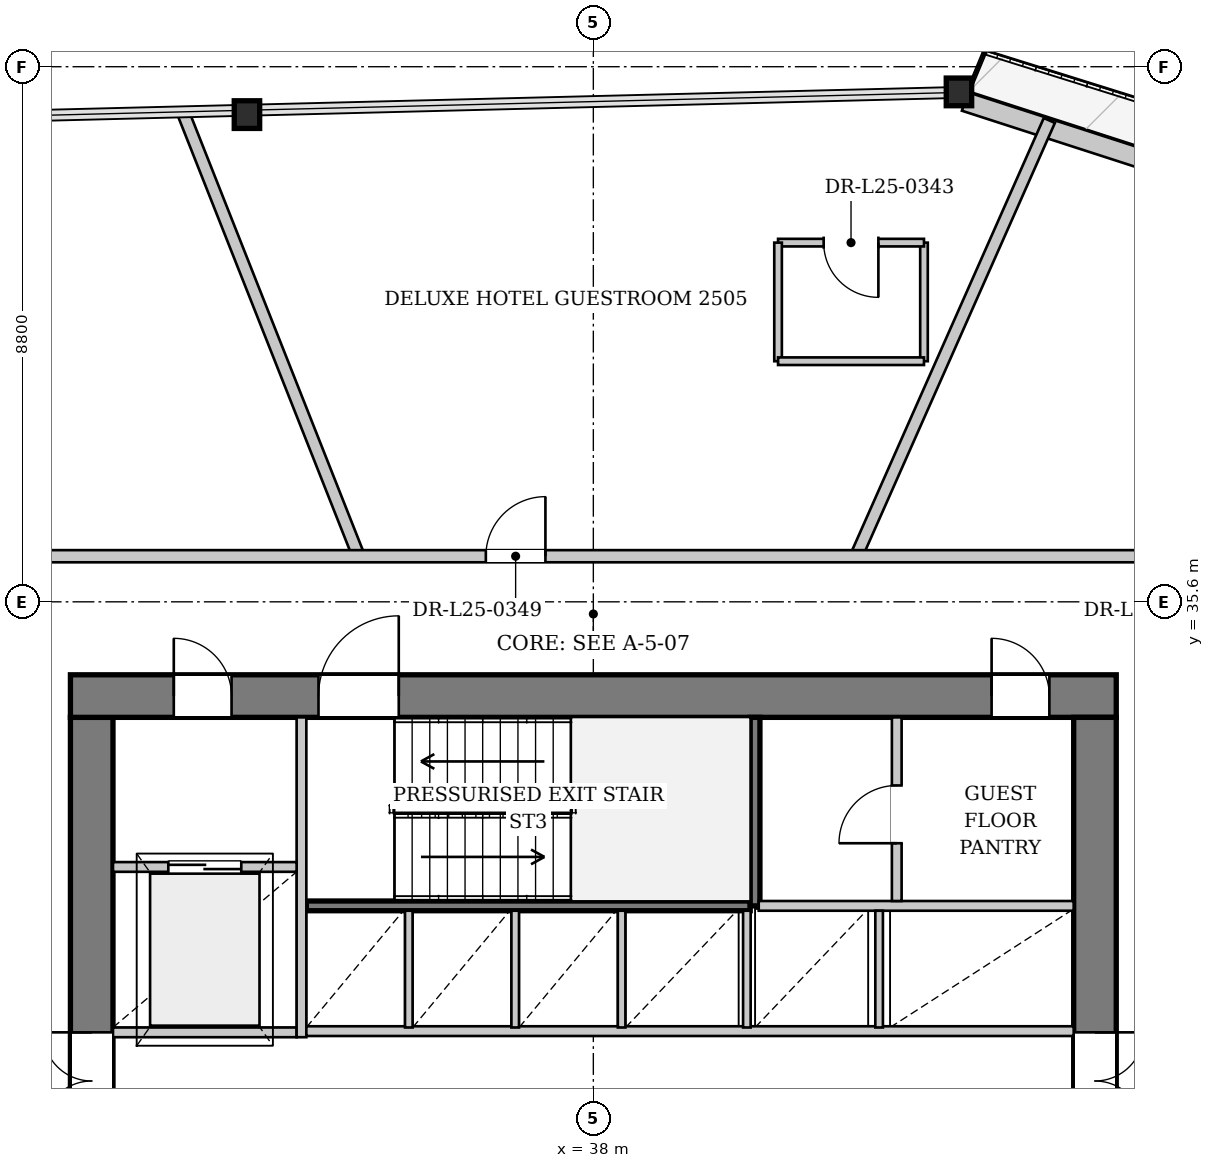
"""IFC4 building model, lengths in metres.
Left out: names, types, materials, properties, quantities, classifications, styles, units other than length and angle.
Written with IfcOpenShell. Run it as: python <this file> out.ifc"""

import sys

from ifc_helpers import new_model, si_unit, direction, frame, frame_2d, origin, origin_2d, place, context, subcontext, project, spatial, rectangle, i_section, extrude, source, transform, mapped, element, fill, save


model = new_model("IFC4")
c1 = context("Model", 3, precision=1e-05, world=origin(), true_north=direction((0.0, 1.0)))
c2 = subcontext(c1, "Body", "Model", "MODEL_VIEW")
j1 = project(units=[si_unit("LENGTHUNIT", "METRE"), si_unit("PLANEANGLEUNIT", "RADIAN")], contexts=[c1])
p1 = place(None, origin())
s1 = spatial("IfcSite", under=j1, at=p1, CompositionType="ELEMENT")
p2 = place(p1, origin())
s2 = spatial("IfcBuilding", under=s1, at=p2, CompositionType="ELEMENT")
p3 = place(p2, frame((0.0, 0.0, 98.6)))
s3 = spatial("IfcBuildingStorey", under=s2, at=p3, CompositionType="ELEMENT", Elevation=98.6)
m1 = source(origin(), c2, "Body", "SweptSolid", [
    extrude(i_section(OverallWidth=0.418, OverallDepth=0.455, WebThickness=0.038, FlangeThickness=0.059, at=origin_2d()), origin(), (0.0, 0.0, 1.0), 3.398),
])
p4 = place(p3, frame((44.16, 43.981, 0.0), z_axis=(-0.086440081787, 0.003017858217, 0.996252480445), x_axis=(-0.034891460117, -0.999391107631, 0.0)))
e1 = element("IfcColumn", 1, at=p4, inside=s3, PredefinedType="COLUMN", context=c2, shape_type="MappedRepresentation", body=[
    mapped(m1, transform((0.0, 0.0, 0.0), x_axis=(1.0, 0.0, 0.0), y_axis=(0.0, 1.0, 0.0), z_axis=(0.0, 0.0, 1.0), scale=1.0)),
])
m2 = source(origin(), c2, "Body", "SweptSolid", [
    extrude(i_section(OverallWidth=0.418, OverallDepth=0.455, WebThickness=0.038, FlangeThickness=0.059, at=origin_2d()), origin(), (0.0, 0.0, 1.0), 3.399),
])
p5 = place(p3, frame((32.44, 43.688, 0.0), z_axis=(-0.080295380378, -0.044169641263, 0.995791993682), x_axis=(0.481978917969, -0.876182813478, 0.0)))
e2 = element("IfcColumn", 2, at=p5, inside=s3, PredefinedType="COLUMN", context=c2, shape_type="MappedRepresentation", body=[
    mapped(m2, transform((0.0, 0.0, 0.0), x_axis=(1.0, 0.0, 0.0), y_axis=(0.0, 1.0, 0.0), z_axis=(0.0, 0.0, 1.0), scale=1.0)),
])
p6 = place(p3, frame((44.111, 43.829, 0.0), z_axis=(0.0, 0.0, 1.0), x_axis=(0.951457074242, -0.307781474224, 0.0)))
e3 = element("IfcWall", 3, at=p6, inside=s3, PredefinedType="SOLIDWALL", context=c2, shape_type="SweptSolid", body=[
    extrude(rectangle(XDim=23.448, YDim=0.32, at=frame_2d((11.724, 0.0))), origin(), (0.0, 0.0, 1.0), 2.692),
])
p7 = place(p6, frame((6.953, 0.0, 0.0)))
e4 = element("IfcOpeningElement", 4, at=p7, cuts=e3, PredefinedType="OPENING", context=c2, shape_type="SweptSolid", body=[
    extrude(rectangle(XDim=1.1, YDim=2.3, at=frame_2d((0.55, 1.15))), frame((0.0, 0.17, 0.0), z_axis=(0.0, -1.0, 0.0), x_axis=(1.0, 0.0, 0.0)), (0.0, 0.0, 1.0), 0.34),
])
p8 = place(p6, frame((16.451, 0.0, 0.372)))
e5 = element("IfcOpeningElement", 5, at=p8, cuts=e3, PredefinedType="OPENING", context=c2, shape_type="SweptSolid", body=[
    extrude(rectangle(XDim=1.8, YDim=2.2, at=frame_2d((0.9, 1.1))), frame((0.0, 0.17, 0.0), z_axis=(0.0, -1.0, 0.0), x_axis=(1.0, 0.0, 0.0)), (0.0, 0.0, 1.0), 0.34),
])
p9 = place(p3, frame((29.75, 19.5, 0.0), z_axis=(0.0, 0.0, 1.0), x_axis=(0.0, 1.0, 0.0)))
e6 = element("IfcWall", 6, at=p9, inside=s3, PredefinedType="SHEAR", context=c2, shape_type="SweptSolid", body=[
    extrude(rectangle(XDim=14.2, YDim=0.7, at=frame_2d((7.1, 0.0))), origin(), (0.0, 0.0, 1.0), 3.3),
])
p10 = place(p9, frame((7.42, 0.0, 0.0)))
e7 = element("IfcOpeningElement", 7, at=p10, cuts=e6, PredefinedType="OPENING", context=c2, shape_type="SweptSolid", body=[
    extrude(rectangle(XDim=1.6, YDim=2.2, at=frame_2d((0.8, 1.1))), frame((0.0, 0.36, 0.0), z_axis=(0.0, -1.0, 0.0), x_axis=(1.0, 0.0, 0.0)), (0.0, 0.0, 1.0), 0.72),
])
p11 = place(p3, frame((29.4, 34.05, 0.0), z_axis=(0.0, 0.0, 1.0), x_axis=(1.0, 0.0, 0.0)))
e8 = element("IfcWall", 8, at=p11, inside=s3, PredefinedType="SHEAR", context=c2, shape_type="SweptSolid", body=[
    extrude(rectangle(XDim=17.2, YDim=0.7, at=frame_2d((8.6, 0.0))), origin(), (0.0, 0.0, 1.0), 3.3),
])
p12 = place(p11, frame((1.7, 0.0, 0.0)))
e9 = element("IfcOpeningElement", 9, at=p12, cuts=e8, PredefinedType="OPENING", context=c2, shape_type="SweptSolid", body=[
    extrude(rectangle(XDim=0.95, YDim=2.1, at=frame_2d((0.475, 1.05))), frame((0.0, 0.36, 0.0), z_axis=(0.0, -1.0, 0.0), x_axis=(1.0, 0.0, 0.0)), (0.0, 0.0, 1.0), 0.72),
])
p13 = place(p11, frame((4.08, 0.0, 0.0)))
e10 = element("IfcOpeningElement", 10, at=p13, cuts=e8, PredefinedType="OPENING", context=c2, shape_type="SweptSolid", body=[
    extrude(rectangle(XDim=1.32, YDim=2.2, at=frame_2d((0.66, 1.1))), frame((0.0, 0.36, 0.0), z_axis=(0.0, -1.0, 0.0), x_axis=(1.0, 0.0, 0.0)), (0.0, 0.0, 1.0), 0.72),
])
p14 = place(p11, frame((15.15, 0.0, 0.0)))
e11 = element("IfcOpeningElement", 11, at=p14, cuts=e8, PredefinedType="OPENING", context=c2, shape_type="SweptSolid", body=[
    extrude(rectangle(XDim=0.95, YDim=2.1, at=frame_2d((0.475, 1.05))), frame((0.0, 0.36, 0.0), z_axis=(0.0, -1.0, 0.0), x_axis=(1.0, 0.0, 0.0)), (0.0, 0.0, 1.0), 0.72),
])
p15 = place(p3, frame((46.25, 33.7, 0.0), z_axis=(0.0, 0.0, 1.0), x_axis=(0.0, -1.0, 0.0)))
e12 = element("IfcWall", 12, at=p15, inside=s3, PredefinedType="SHEAR", context=c2, shape_type="SweptSolid", body=[
    extrude(rectangle(XDim=14.2, YDim=0.7, at=frame_2d((7.1, 0.0))), origin(), (0.0, 0.0, 1.0), 3.3),
])
p16 = place(p15, frame((5.18, 0.0, 0.0)))
e13 = element("IfcOpeningElement", 13, at=p16, cuts=e12, PredefinedType="OPENING", context=c2, shape_type="SweptSolid", body=[
    extrude(rectangle(XDim=1.6, YDim=2.2, at=frame_2d((0.8, 1.1))), frame((0.0, 0.36, 0.0), z_axis=(0.0, -1.0, 0.0), x_axis=(1.0, 0.0, 0.0)), (0.0, 0.0, 1.0), 0.72),
])
p17 = place(p3, frame((33.28, 30.6, 0.0), z_axis=(0.0, 0.0, 1.0), x_axis=(1.0, 0.0, 0.0)))
e14 = element("IfcWall", 14, at=p17, inside=s3, PredefinedType="PARTITIONING", context=c2, shape_type="SweptSolid", body=[
    extrude(rectangle(XDim=7.3, YDim=0.16, at=frame_2d((3.65, 0.0))), origin(), (0.0, 0.0, 1.0), 3.3),
])
p18 = place(p3, frame((40.66, 30.6, 0.0), z_axis=(0.0, 0.0, 1.0), x_axis=(0.0, 1.0, 0.0)))
e15 = element("IfcWall", 15, at=p18, inside=s3, PredefinedType="PARTITIONING", context=c2, shape_type="SweptSolid", body=[
    extrude(rectangle(XDim=3.1, YDim=0.16, at=frame_2d((1.55, 0.0))), origin(), (0.0, 0.0, 1.0), 3.3),
])
p19 = place(p3, frame((30.1, 28.52, 0.0), z_axis=(0.0, 0.0, 1.0), x_axis=(1.0, 0.0, 0.0)))
e16 = element("IfcWall", 16, at=p19, inside=s3, PredefinedType="PARTITIONING", context=c2, shape_type="SweptSolid", body=[
    extrude(rectangle(XDim=3.02, YDim=0.16, at=frame_2d((1.51, 0.0))), origin(), (0.0, 0.0, 1.0), 3.3),
])
p20 = place(p3, frame((33.2, 28.44, 0.0), z_axis=(0.0, 0.0, 1.0), x_axis=(0.0, 1.0, 0.0)))
e17 = element("IfcWall", 17, at=p20, inside=s3, PredefinedType="PARTITIONING", context=c2, shape_type="SweptSolid", body=[
    extrude(rectangle(XDim=5.26, YDim=0.16, at=frame_2d((2.63, 0.0))), origin(), (0.0, 0.0, 1.0), 3.3),
])
p21 = place(p3, frame((30.1, 31.24, 0.0), z_axis=(0.0, 0.0, 1.0), x_axis=(1.0, 0.0, 0.0)))
e18 = element("IfcWall", 18, at=p21, inside=s3, PredefinedType="PARTITIONING", context=c2, shape_type="SweptSolid", body=[
    extrude(rectangle(XDim=3.02, YDim=0.16, at=frame_2d((1.51, 0.0))), origin(), (0.0, 0.0, 1.0), 3.3),
])
p22 = place(p21, frame((0.91, 0.0, 0.0)))
e19 = element("IfcOpeningElement", 19, at=p22, cuts=e18, PredefinedType="OPENING", context=c2, shape_type="SweptSolid", body=[
    extrude(rectangle(XDim=1.2, YDim=2.2, at=frame_2d((0.6, 1.1))), frame((0.0, 0.09, 0.0), z_axis=(0.0, -1.0, 0.0), x_axis=(1.0, 0.0, 0.0)), (0.0, 0.0, 1.0), 0.18),
])
p23 = place(p3, frame((33.28, 28.54, 0.0), z_axis=(0.0, 0.0, 1.0), x_axis=(1.0, 0.0, 0.0)))
e20 = element("IfcWall", 20, at=p23, inside=s3, PredefinedType="PARTITIONING", context=c2, shape_type="SweptSolid", body=[
    extrude(rectangle(XDim=12.62, YDim=0.16, at=frame_2d((6.31, 0.0))), origin(), (0.0, 0.0, 1.0), 3.3),
])
p24 = place(p3, frame((40.72, 30.6, 0.0), z_axis=(0.0, 0.0, 1.0), x_axis=(1.0, 0.0, 0.0)))
e21 = element("IfcWall", 21, at=p24, inside=s3, PredefinedType="PARTITIONING", context=c2, shape_type="SweptSolid", body=[
    extrude(rectangle(XDim=5.18, YDim=0.16, at=frame_2d((2.59, 0.0))), origin(), (0.0, 0.0, 1.0), 3.3),
])
for number, where, z_axis, x_axis in (
    (22, (34.965, 28.6, 0.0), (0.0, 0.0, 1.0), (0.0, 1.0, 0.0)),
    (23, (36.715, 28.6, 0.0), (0.0, 0.0, 1.0), (0.0, 1.0, 0.0)),
    (24, (38.465, 28.6, 0.0), (0.0, 0.0, 1.0), (0.0, 1.0, 0.0)),
    (25, (40.525, 28.6, 0.0), (0.0, 0.0, 1.0), (0.0, 1.0, 0.0)),
    (26, (42.7, 28.6, 0.0), (0.0, 0.0, 1.0), (0.0, 1.0, 0.0)),
):
    element("IfcWall", number, at=place(p3, frame(where, z_axis=z_axis, x_axis=x_axis)), inside=s3, PredefinedType="PARTITIONING", context=c2, shape_type="SweptSolid", body=[
        extrude(rectangle(XDim=1.92, YDim=0.125, at=frame_2d((0.96, 0.0))), origin(), (0.0, 0.0, 1.0), 3.3),
    ])
p25 = place(p3, frame((42.99, 30.68, 0.0), z_axis=(0.0, 0.0, 1.0), x_axis=(0.0, 1.0, 0.0)))
e27 = element("IfcWall", 27, at=p25, inside=s3, PredefinedType="PARTITIONING", context=c2, shape_type="SweptSolid", body=[
    extrude(rectangle(XDim=3.02, YDim=0.16, at=frame_2d((1.51, 0.0))), origin(), (0.0, 0.0, 1.0), 3.3),
])
p26 = place(p25, frame((0.95, 0.0, 0.0)))
e28 = element("IfcOpeningElement", 28, at=p26, cuts=e27, PredefinedType="OPENING", context=c2, shape_type="SweptSolid", body=[
    extrude(rectangle(XDim=0.95, YDim=2.1, at=frame_2d((0.475, 1.05))), frame((0.0, 0.09, 0.0), z_axis=(0.0, -1.0, 0.0), x_axis=(1.0, 0.0, 0.0)), (0.0, 0.0, 1.0), 0.18),
])
p27 = place(p3, frame((42.323, 36.35, 0.0), z_axis=(0.0, 0.0, 1.0), x_axis=(0.40528287346, 0.914191332534, 0.0)))
e29 = element("IfcWall", 29, at=p27, inside=s3, PredefinedType="PARTITIONING", context=c2, shape_type="SweptSolid", body=[
    extrude(rectangle(XDim=7.838, YDim=0.2, at=frame_2d((3.919, 0.0))), origin(), (0.0, 0.0, 1.0), 3.3),
])
p28 = place(p3, frame((34.141, 36.35, 0.0), z_axis=(0.0, 0.0, 1.0), x_axis=(-0.368043395043, 0.929808614375, 0.0)))
e30 = element("IfcWall", 30, at=p28, inside=s3, PredefinedType="PARTITIONING", context=c2, shape_type="SweptSolid", body=[
    extrude(rectangle(XDim=7.827, YDim=0.2, at=frame_2d((3.914, 0.0))), origin(), (0.0, 0.0, 1.0), 3.3),
])
p29 = place(p3, frame((43.438, 39.557, 0.0), z_axis=(0.0, 0.0, 1.0), x_axis=(0.0, 1.0, 0.0)))
e31 = element("IfcWall", 31, at=p29, inside=s3, PredefinedType="PARTITIONING", context=c2, shape_type="SweptSolid", body=[
    extrude(rectangle(XDim=1.95, YDim=0.125, at=frame_2d((0.975, 0.0))), origin(), (0.0, 0.0, 1.0), 3.3),
])
p30 = place(p3, frame((43.438, 41.507, 0.0), z_axis=(0.0, 0.0, 1.0), x_axis=(-1.0, 0.0, 0.0)))
e32 = element("IfcWall", 32, at=p30, inside=s3, PredefinedType="PARTITIONING", context=c2, shape_type="SweptSolid", body=[
    extrude(rectangle(XDim=2.4, YDim=0.125, at=frame_2d((1.2, 0.0))), origin(), (0.0, 0.0, 1.0), 3.3),
])
p31 = place(p30, frame((0.75, 0.0, 0.0)))
e33 = element("IfcOpeningElement", 33, at=p31, cuts=e32, PredefinedType="OPENING", context=c2, shape_type="SweptSolid", body=[
    extrude(rectangle(XDim=0.9, YDim=2.1, at=frame_2d((0.45, 1.05))), frame((0.0, 0.073, 0.0), z_axis=(0.0, -1.0, 0.0), x_axis=(1.0, 0.0, 0.0)), (0.0, 0.0, 1.0), 0.145),
])
p32 = place(p3, frame((41.038, 41.507, 0.0), z_axis=(0.0, 0.0, 1.0), x_axis=(0.0, -1.0, 0.0)))
e34 = element("IfcWall", 34, at=p32, inside=s3, PredefinedType="PARTITIONING", context=c2, shape_type="SweptSolid", body=[
    extrude(rectangle(XDim=1.95, YDim=0.125, at=frame_2d((0.975, 0.0))), origin(), (0.0, 0.0, 1.0), 3.3),
])
p33 = place(p3, frame((41.038, 39.557, 0.0), z_axis=(0.0, 0.0, 1.0), x_axis=(1.0, 0.0, 0.0)))
e35 = element("IfcWall", 35, at=p33, inside=s3, PredefinedType="PARTITIONING", context=c2, shape_type="SweptSolid", body=[
    extrude(rectangle(XDim=2.4, YDim=0.125, at=frame_2d((1.2, 0.0))), origin(), (0.0, 0.0, 1.0), 2.985),
])
p34 = place(p3, frame((27.45, 36.35, 0.0), z_axis=(0.0, 0.0, 1.0), x_axis=(1.0, 0.0, 0.0)))
e36 = element("IfcWall", 36, at=p34, inside=s3, PredefinedType="PARTITIONING", context=c2, shape_type="SweptSolid", body=[
    extrude(rectangle(XDim=21.1, YDim=0.2, at=frame_2d((10.55, 0.0))), origin(), (0.0, 0.0, 1.0), 3.3),
])
p35 = place(p34, frame((19.82, 0.0, 0.0)))
e37 = element("IfcOpeningElement", 37, at=p35, cuts=e36, PredefinedType="OPENING", context=c2, shape_type="SweptSolid", body=[
    extrude(rectangle(XDim=0.98, YDim=2.15, at=frame_2d((0.49, 1.075))), frame((0.0, 0.11, 0.0), z_axis=(0.0, -1.0, 0.0), x_axis=(1.0, 0.0, 0.0)), (0.0, 0.0, 1.0), 0.22),
])
p36 = place(p34, frame((8.782, 0.0, 0.0)))
e38 = element("IfcOpeningElement", 38, at=p36, cuts=e36, PredefinedType="OPENING", context=c2, shape_type="SweptSolid", body=[
    extrude(rectangle(XDim=0.98, YDim=2.15, at=frame_2d((0.49, 1.075))), frame((0.0, 0.11, 0.0), z_axis=(0.0, -1.0, 0.0), x_axis=(1.0, 0.0, 0.0)), (0.0, 0.0, 1.0), 0.22),
])
m3 = source(origin(), c2, "Body", "SweptSolid", [
    extrude(rectangle(XDim=1.6, YDim=2.2, at=frame_2d((0.8, 1.1))), frame((0.0, 0.025, 0.0), z_axis=(0.0, -1.0, 0.0), x_axis=(1.0, 0.0, 0.0)), (0.0, 0.0, 1.0), 0.05),
])
p37 = place(p10, origin())
e39 = element("IfcDoor", 39, at=p37, inside=s3, OperationType="DOUBLE_DOOR_SINGLE_SWING", PredefinedType="DOOR", context=c2, shape_type="MappedRepresentation", body=[
    mapped(m3, transform((0.0, 0.0, 0.0), x_axis=(1.0, 0.0, 0.0), y_axis=(0.0, 1.0, 0.0), z_axis=(0.0, 0.0, 1.0), scale=1.0)),
])
fill(e7, e39)
m4 = source(origin(), c2, "Body", "SweptSolid", [
    extrude(rectangle(XDim=0.95, YDim=2.1, at=frame_2d((0.475, 1.05))), frame((0.0, 0.025, 0.0), z_axis=(0.0, -1.0, 0.0), x_axis=(1.0, 0.0, 0.0)), (0.0, 0.0, 1.0), 0.05),
])
p38 = place(p12, origin())
e40 = element("IfcDoor", 40, at=p38, inside=s3, OperationType="SINGLE_SWING_LEFT", PredefinedType="DOOR", context=c2, shape_type="MappedRepresentation", body=[
    mapped(m4, transform((0.0, 0.0, 0.0), x_axis=(1.0, 0.0, 0.0), y_axis=(0.0, 1.0, 0.0), z_axis=(0.0, 0.0, 1.0), scale=1.0)),
])
fill(e9, e40)
m5 = source(origin(), c2, "Body", "SweptSolid", [
    extrude(rectangle(XDim=1.32, YDim=2.2, at=frame_2d((0.66, 1.1))), frame((0.0, 0.025, 0.0), z_axis=(0.0, -1.0, 0.0), x_axis=(1.0, 0.0, 0.0)), (0.0, 0.0, 1.0), 0.05),
])
p39 = place(p13, origin())
e41 = element("IfcDoor", 41, at=p39, inside=s3, OperationType="SINGLE_SWING_RIGHT", PredefinedType="DOOR", context=c2, shape_type="MappedRepresentation", body=[
    mapped(m5, transform((0.0, 0.0, 0.0), x_axis=(1.0, 0.0, 0.0), y_axis=(0.0, 1.0, 0.0), z_axis=(0.0, 0.0, 1.0), scale=1.0)),
])
fill(e10, e41)
p40 = place(p16, origin())
e42 = element("IfcDoor", 42, at=p40, inside=s3, OperationType="DOUBLE_DOOR_SINGLE_SWING", PredefinedType="DOOR", context=c2, shape_type="MappedRepresentation", body=[
    mapped(m3, transform((0.0, 0.0, 0.0), x_axis=(1.0, 0.0, 0.0), y_axis=(0.0, 1.0, 0.0), z_axis=(0.0, 0.0, 1.0), scale=1.0)),
])
fill(e13, e42)
m6 = source(origin(), c2, "Body", "SweptSolid", [
    extrude(rectangle(XDim=1.2, YDim=2.2, at=frame_2d((0.6, 1.1))), frame((0.0, 0.025, 0.0), z_axis=(0.0, -1.0, 0.0), x_axis=(1.0, 0.0, 0.0)), (0.0, 0.0, 1.0), 0.05),
])
p41 = place(p22, origin())
e43 = element("IfcDoor", 43, at=p41, inside=s3, OperationType="DOUBLE_DOOR_SLIDING", PredefinedType="DOOR", context=c2, shape_type="MappedRepresentation", body=[
    mapped(m6, transform((0.0, 0.0, 0.0), x_axis=(1.0, 0.0, 0.0), y_axis=(0.0, 1.0, 0.0), z_axis=(0.0, 0.0, 1.0), scale=1.0)),
])
fill(e19, e43)
p42 = place(p26, origin())
e44 = element("IfcDoor", 44, at=p42, inside=s3, OperationType="SINGLE_SWING_LEFT", PredefinedType="DOOR", context=c2, shape_type="MappedRepresentation", body=[
    mapped(m4, transform((0.0, 0.0, 0.0), x_axis=(1.0, 0.0, 0.0), y_axis=(0.0, 1.0, 0.0), z_axis=(0.0, 0.0, 1.0), scale=1.0)),
])
fill(e28, e44)
p43 = place(p14, origin())
e45 = element("IfcDoor", 45, at=p43, inside=s3, OperationType="SINGLE_SWING_LEFT", PredefinedType="DOOR", context=c2, shape_type="MappedRepresentation", body=[
    mapped(m4, transform((0.0, 0.0, 0.0), x_axis=(1.0, 0.0, 0.0), y_axis=(0.0, 1.0, 0.0), z_axis=(0.0, 0.0, 1.0), scale=1.0)),
])
fill(e11, e45)
m7 = source(origin(), c2, "Body", "SweptSolid", [
    extrude(rectangle(XDim=0.9, YDim=2.1, at=frame_2d((0.45, 1.05))), frame((0.0, 0.025, 0.0), z_axis=(0.0, -1.0, 0.0), x_axis=(1.0, 0.0, 0.0)), (0.0, 0.0, 1.0), 0.05),
])
p44 = place(p31, origin())
e46 = element("IfcDoor", 46, at=p44, inside=s3, OperationType="SINGLE_SWING_LEFT", PredefinedType="DOOR", context=c2, shape_type="MappedRepresentation", body=[
    mapped(m7, transform((0.0, 0.0, 0.0), x_axis=(1.0, 0.0, 0.0), y_axis=(0.0, 1.0, 0.0), z_axis=(0.0, 0.0, 1.0), scale=1.0)),
])
fill(e33, e46)
m8 = source(origin(), c2, "Body", "SweptSolid", [
    extrude(rectangle(XDim=0.98, YDim=2.15, at=frame_2d((0.49, 1.075))), frame((0.0, 0.025, 0.0), z_axis=(0.0, -1.0, 0.0), x_axis=(1.0, 0.0, 0.0)), (0.0, 0.0, 1.0), 0.05),
])
p45 = place(p36, origin())
e47 = element("IfcDoor", 47, at=p45, inside=s3, OperationType="SINGLE_SWING_RIGHT", PredefinedType="DOOR", context=c2, shape_type="MappedRepresentation", body=[
    mapped(m8, transform((0.0, 0.0, 0.0), x_axis=(1.0, 0.0, 0.0), y_axis=(0.0, 1.0, 0.0), z_axis=(0.0, 0.0, 1.0), scale=1.0)),
])
fill(e38, e47)
save(model, sys.argv[1])
